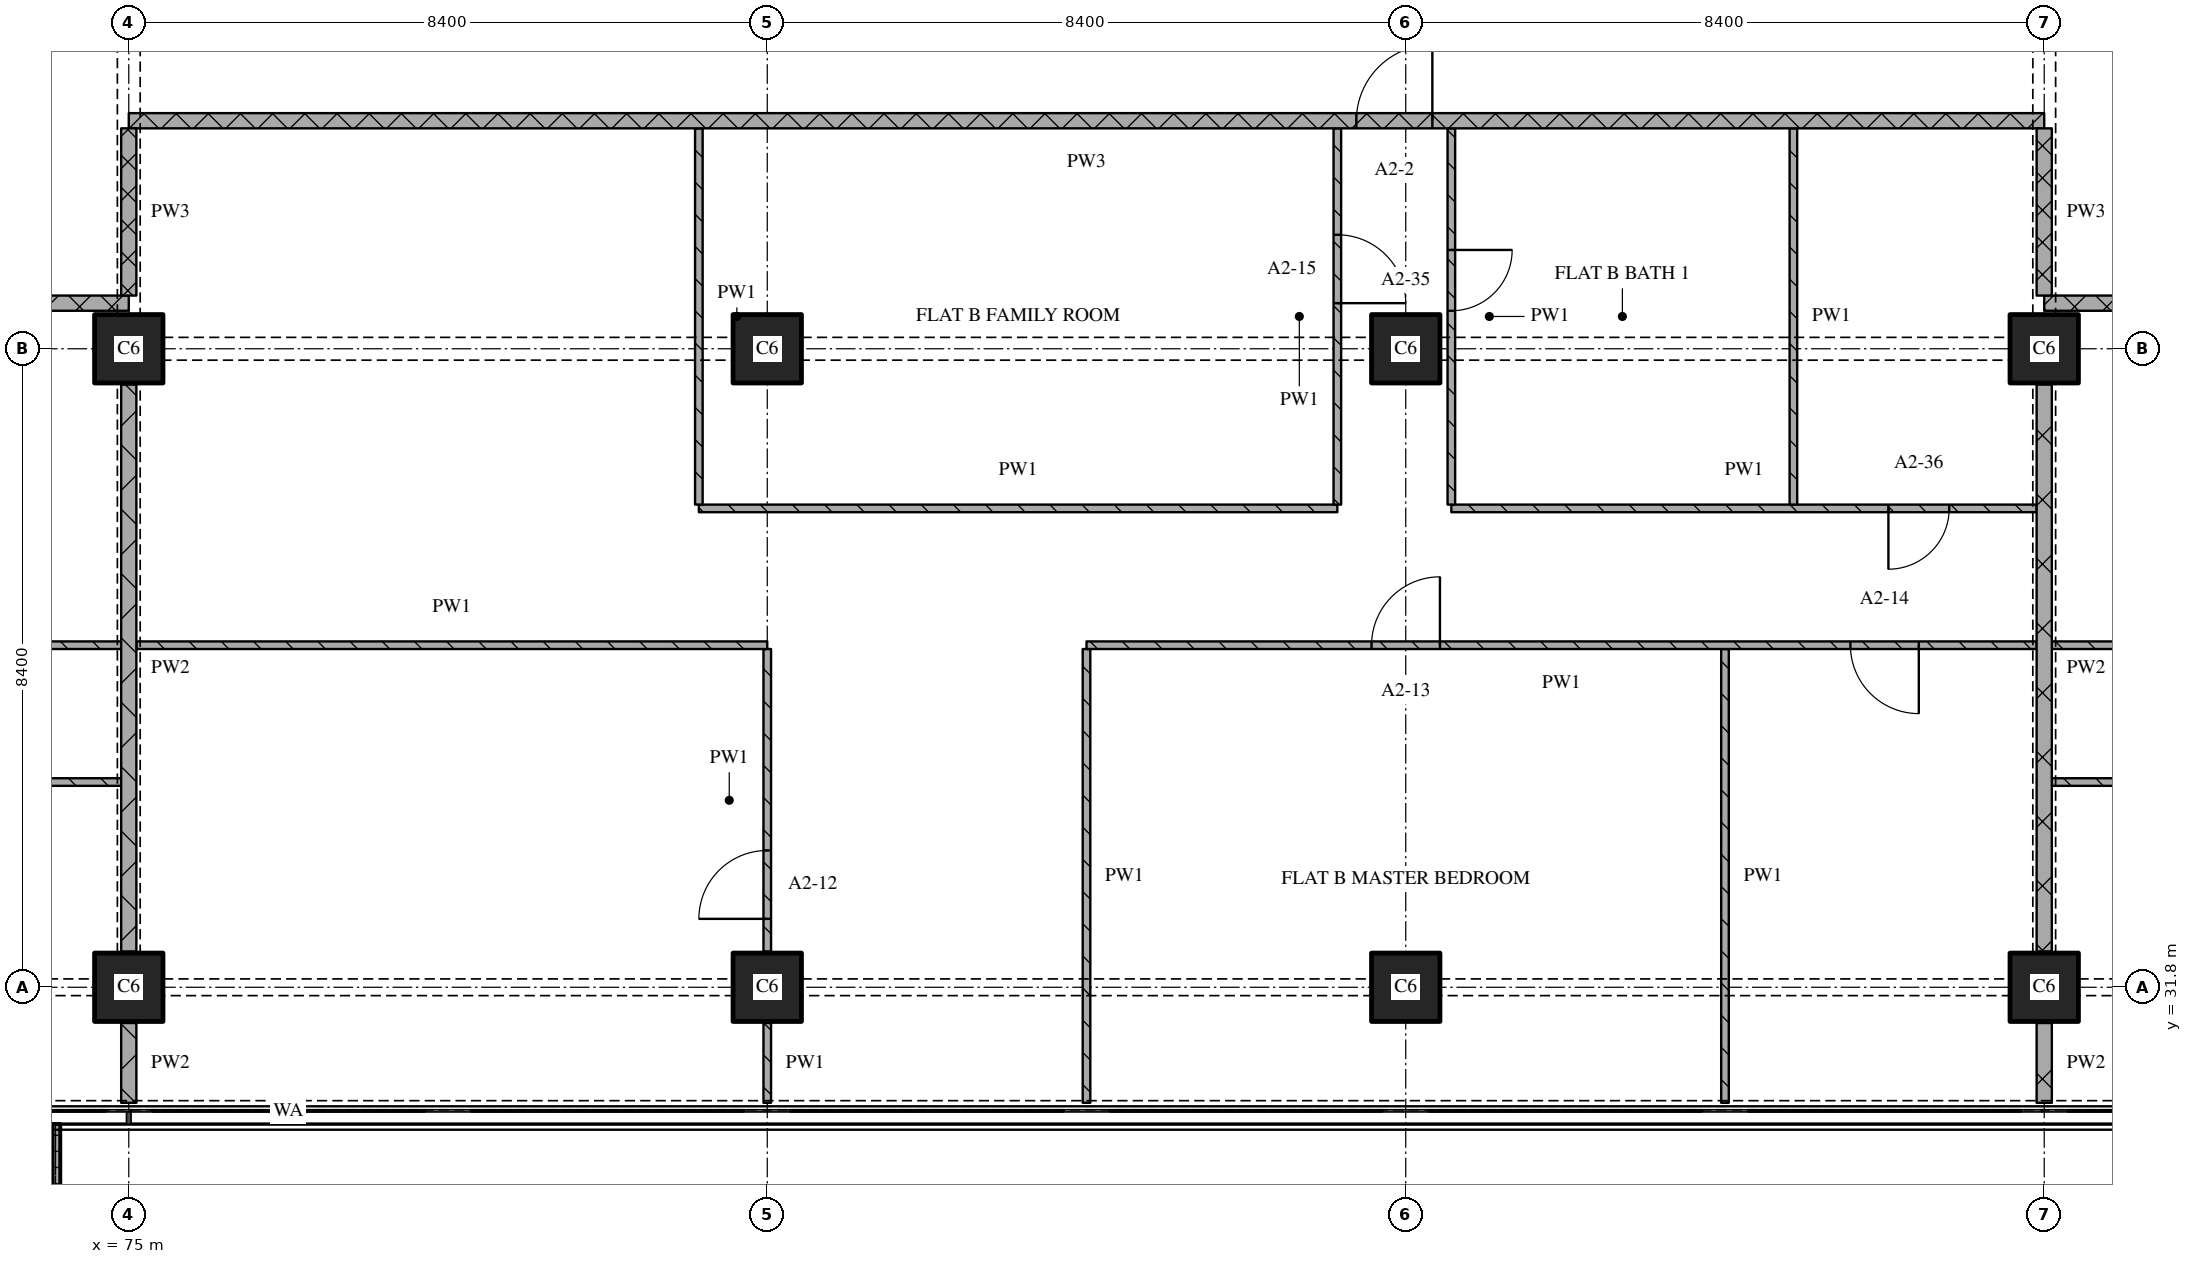
"""IFC4 building model, lengths in metres.
Left out: names, types, materials, properties, quantities, classifications, styles, units other than length and angle.
Written with IfcOpenShell. Run it as: python <this file> out.ifc"""

import sys

from ifc_helpers import new_model, si_unit, direction, frame, frame_2d, origin, origin_2d, place, context, subcontext, project, spatial, polyline, rectangle, outline, extrude, element, fill, save


model = new_model("IFC4")
c1 = context("Model", 3, precision=1e-05, world=origin(), true_north=direction((0.0, 1.0)))
c2 = subcontext(c1, "Body", "Model", "MODEL_VIEW")
j1 = project(units=[si_unit("LENGTHUNIT", "METRE"), si_unit("PLANEANGLEUNIT", "RADIAN")], contexts=[c1])
p1 = place(None, origin())
s1 = spatial("IfcSite", under=j1, at=p1, CompositionType="ELEMENT")
p2 = place(p1, origin())
s2 = spatial("IfcBuilding", under=s1, at=p2, CompositionType="ELEMENT")
p3 = place(p2, frame((0.0, 0.0, 51.6)))
s3 = spatial("IfcBuildingStorey", under=s2, at=p3, CompositionType="ELEMENT", Elevation=51.6)
for number, where, z_axis, x_axis in (
    (1, (75.0, 31.8, 0.0), (0.0, 0.0, 1.0), (1.0, 0.0, 0.0)),
    (2, (75.0, 40.2, 0.0), (0.0, 0.0, 1.0), (1.0, 0.0, 0.0)),
    (3, (83.4, 31.8, 0.0), (0.0, 0.0, 1.0), (1.0, 0.0, 0.0)),
    (4, (83.4, 40.2, 0.0), (0.0, 0.0, 1.0), (1.0, 0.0, 0.0)),
    (5, (91.8, 31.8, 0.0), (0.0, 0.0, 1.0), (1.0, 0.0, 0.0)),
    (6, (91.8, 40.2, 0.0), (0.0, 0.0, 1.0), (1.0, 0.0, 0.0)),
    (7, (100.2, 31.8, 0.0), (0.0, 0.0, 1.0), (1.0, 0.0, 0.0)),
    (8, (100.2, 40.2, 0.0), (0.0, 0.0, 1.0), (1.0, 0.0, 0.0)),
):
    element("IfcColumn", number, at=place(p3, frame(where, z_axis=z_axis, x_axis=x_axis)), inside=s3, PredefinedType="COLUMN", context=c2, shape_type="SweptSolid", body=[
        extrude(rectangle(XDim=0.9, YDim=0.9, at=origin_2d()), origin(), (0.0, 0.0, 1.0), 3.6),
    ])
p4 = place(p3, origin())
e9 = element("IfcWall", 9, at=p4, inside=s3, PredefinedType="SOLIDWALL", context=c2, shape_type="SweptSolid", body=[
    extrude(outline(polyline([(71.7, 30.0), (71.8, 30.0), (71.8, 28.5), (74.0, 28.5), (74.0, 30.0), (74.1, 30.0), (74.1, 28.4), (71.7, 28.4), (71.7, 30.0)])), origin(), (0.0, 0.0, 1.0), 1.0),
])
p5 = place(p3, frame((74.9, 34.5, 0.0), z_axis=(0.0, 0.0, 1.0), x_axis=(-1.0, 0.0, 0.0)))
e10 = element("IfcWall", 10, at=p5, inside=s3, PredefinedType="PARTITIONING", context=c2, shape_type="SweptSolid", body=[
    extrude(rectangle(XDim=16.7, YDim=0.1, at=frame_2d((8.35, 0.0))), origin(), (0.0, 0.0, 1.0), 3.32),
])
p6 = place(p5, frame((3.65, 0.0, 0.0)))
e11 = element("IfcOpeningElement", 11, at=p6, cuts=e10, PredefinedType="OPENING", context=c2, shape_type="SweptSolid", body=[
    extrude(rectangle(XDim=0.9, YDim=2.1, at=frame_2d((0.45, 1.05))), frame((0.0, 0.06, 0.0), z_axis=(0.0, -1.0, 0.0), x_axis=(1.0, 0.0, 0.0)), (0.0, 0.0, 1.0), 0.12),
])
p7 = place(p5, frame((12.05, 0.0, 0.0)))
e12 = element("IfcOpeningElement", 12, at=p7, cuts=e10, PredefinedType="OPENING", context=c2, shape_type="SweptSolid", body=[
    extrude(rectangle(XDim=0.9, YDim=2.1, at=frame_2d((0.45, 1.05))), frame((0.0, 0.06, 0.0), z_axis=(0.0, -1.0, 0.0), x_axis=(1.0, 0.0, 0.0)), (0.0, 0.0, 1.0), 0.12),
])
p8 = place(p3, frame((117.0, 34.5, 0.0), z_axis=(0.0, 0.0, 1.0), x_axis=(-1.0, 0.0, 0.0)))
e13 = element("IfcWall", 13, at=p8, inside=s3, PredefinedType="PARTITIONING", context=c2, shape_type="SweptSolid", body=[
    extrude(rectangle(XDim=16.7, YDim=0.1, at=frame_2d((8.35, 0.0))), origin(), (0.0, 0.0, 1.0), 3.32),
])
p9 = place(p8, frame((7.95, 0.0, 0.0)))
e14 = element("IfcOpeningElement", 14, at=p9, cuts=e13, PredefinedType="OPENING", context=c2, shape_type="SweptSolid", body=[
    extrude(rectangle(XDim=0.9, YDim=2.1, at=frame_2d((0.45, 1.05))), frame((0.0, 0.06, 0.0), z_axis=(0.0, -1.0, 0.0), x_axis=(1.0, 0.0, 0.0)), (0.0, 0.0, 1.0), 0.12),
])
p10 = place(p8, frame((14.25, 0.0, 0.0)))
e15 = element("IfcOpeningElement", 15, at=p10, cuts=e13, PredefinedType="OPENING", context=c2, shape_type="SweptSolid", body=[
    extrude(rectangle(XDim=0.9, YDim=2.1, at=frame_2d((0.45, 1.05))), frame((0.0, 0.06, 0.0), z_axis=(0.0, -1.0, 0.0), x_axis=(1.0, 0.0, 0.0)), (0.0, 0.0, 1.0), 0.12),
])
p11 = place(p3, frame((82.5, 38.1, 0.0), z_axis=(0.0, 0.0, 1.0), x_axis=(1.0, 0.0, 0.0)))
e16 = element("IfcWall", 16, at=p11, inside=s3, PredefinedType="PARTITIONING", context=c2, shape_type="SweptSolid", body=[
    extrude(rectangle(XDim=8.4, YDim=0.1, at=frame_2d((4.2, 0.0))), origin(), (0.0, 0.0, 1.0), 3.32),
])
p12 = place(p3, frame((92.4, 38.1, 0.0), z_axis=(0.0, 0.0, 1.0), x_axis=(1.0, 0.0, 0.0)))
e17 = element("IfcWall", 17, at=p12, inside=s3, PredefinedType="PARTITIONING", context=c2, shape_type="SweptSolid", body=[
    extrude(rectangle(XDim=7.7, YDim=0.1, at=frame_2d((3.85, 0.0))), origin(), (0.0, 0.0, 1.0), 3.32),
])
p13 = place(p12, frame((5.75, 0.0, 0.0)))
e18 = element("IfcOpeningElement", 18, at=p13, cuts=e17, PredefinedType="OPENING", context=c2, shape_type="SweptSolid", body=[
    extrude(rectangle(XDim=0.8, YDim=2.1, at=frame_2d((0.4, 1.05))), frame((0.0, 0.06, 0.0), z_axis=(0.0, -1.0, 0.0), x_axis=(1.0, 0.0, 0.0)), (0.0, 0.0, 1.0), 0.12),
])
p14 = place(p3, frame((75.0, 40.8, 0.0), z_axis=(0.0, 0.0, 1.0), x_axis=(-1.0, 0.0, 0.0)))
e19 = element("IfcWall", 19, at=p14, inside=s3, PredefinedType="PARTITIONING", context=c2, shape_type="SweptSolid", body=[
    extrude(rectangle(XDim=24.08, YDim=0.2, at=frame_2d((12.04, 0.0))), origin(), (0.0, 0.0, 1.0), 3.32),
])
p15 = place(p14, frame((8.95, 0.0, 0.0)))
e20 = element("IfcOpeningElement", 20, at=p15, cuts=e19, PredefinedType="OPENING", context=c2, shape_type="SweptSolid", body=[
    extrude(rectangle(XDim=1.0, YDim=2.1, at=frame_2d((0.5, 1.05))), frame((0.0, 0.11, 0.0), z_axis=(0.0, -1.0, 0.0), x_axis=(1.0, 0.0, 0.0)), (0.0, 0.0, 1.0), 0.22),
])
p16 = place(p3, frame((124.28, 40.8, 0.0), z_axis=(0.0, 0.0, 1.0), x_axis=(-1.0, 0.0, 0.0)))
e21 = element("IfcWall", 21, at=p16, inside=s3, PredefinedType="PARTITIONING", context=c2, shape_type="SweptSolid", body=[
    extrude(rectangle(XDim=24.08, YDim=0.2, at=frame_2d((12.04, 0.0))), origin(), (0.0, 0.0, 1.0), 3.32),
])
p17 = place(p16, frame((12.93, 0.0, 0.0)))
e22 = element("IfcOpeningElement", 22, at=p17, cuts=e21, PredefinedType="OPENING", context=c2, shape_type="SweptSolid", body=[
    extrude(rectangle(XDim=1.0, YDim=2.1, at=frame_2d((0.5, 1.05))), frame((0.0, 0.11, 0.0), z_axis=(0.0, -1.0, 0.0), x_axis=(1.0, 0.0, 0.0)), (0.0, 0.0, 1.0), 0.22),
])
p18 = place(p3, frame((100.2, 43.2, 0.0), z_axis=(0.0, 0.0, 1.0), x_axis=(-1.0, 0.0, 0.0)))
e23 = element("IfcWall", 23, at=p18, inside=s3, PredefinedType="PARTITIONING", context=c2, shape_type="SweptSolid", body=[
    extrude(rectangle(XDim=25.2, YDim=0.2, at=frame_2d((12.6, 0.0))), origin(), (0.0, 0.0, 1.0), 3.32),
])
p19 = place(p18, frame((8.05, 0.0, 0.0)))
e24 = element("IfcOpeningElement", 24, at=p19, cuts=e23, PredefinedType="OPENING", context=c2, shape_type="SweptSolid", body=[
    extrude(rectangle(XDim=1.0, YDim=2.1, at=frame_2d((0.5, 1.05))), frame((0.0, 0.11, 0.0), z_axis=(0.0, -1.0, 0.0), x_axis=(1.0, 0.0, 0.0)), (0.0, 0.0, 1.0), 0.22),
])
p20 = place(p3, frame((75.0, 43.1, 0.0), z_axis=(0.0, 0.0, 1.0), x_axis=(0.0, -1.0, 0.0)))
e25 = element("IfcWall", 25, at=p20, inside=s3, PredefinedType="PARTITIONING", context=c2, shape_type="SweptSolid", body=[
    extrude(rectangle(XDim=2.2, YDim=0.2, at=frame_2d((1.1, 0.0))), origin(), (0.0, 0.0, 1.0), 2.43),
])
p21 = place(p3, frame((75.0, 31.33, 0.0), z_axis=(0.0, 0.0, 1.0), x_axis=(0.0, -1.0, 0.0)))
e26 = element("IfcWall", 26, at=p21, inside=s3, PredefinedType="PARTITIONING", context=c2, shape_type="SweptSolid", body=[
    extrude(rectangle(XDim=1.05, YDim=0.2, at=frame_2d((0.525, 0.0))), origin(), (0.0, 0.0, 1.0), 3.32),
])
p22 = place(p3, frame((75.0, 39.73, 0.0), z_axis=(0.0, 0.0, 1.0), x_axis=(0.0, -1.0, 0.0)))
e27 = element("IfcWall", 27, at=p22, inside=s3, PredefinedType="PARTITIONING", context=c2, shape_type="SweptSolid", body=[
    extrude(rectangle(XDim=7.46, YDim=0.2, at=frame_2d((3.73, 0.0))), origin(), (0.0, 0.0, 1.0), 2.83),
])
p23 = place(p3, frame((82.5, 43.1, 0.0), z_axis=(0.0, 0.0, 1.0), x_axis=(0.0, -1.0, 0.0)))
e28 = element("IfcWall", 28, at=p23, inside=s3, PredefinedType="PARTITIONING", context=c2, shape_type="SweptSolid", body=[
    extrude(rectangle(XDim=4.95, YDim=0.1, at=frame_2d((2.475, 0.0))), origin(), (0.0, 0.0, 1.0), 3.32),
])
p24 = place(p3, frame((83.4, 31.33, 0.0), z_axis=(0.0, 0.0, 1.0), x_axis=(0.0, -1.0, 0.0)))
e29 = element("IfcWall", 29, at=p24, inside=s3, PredefinedType="PARTITIONING", context=c2, shape_type="SweptSolid", body=[
    extrude(rectangle(XDim=1.05, YDim=0.1, at=frame_2d((0.525, 0.0))), origin(), (0.0, 0.0, 1.0), 3.32),
])
p25 = place(p3, frame((83.4, 32.27, 0.0), z_axis=(0.0, 0.0, 1.0), x_axis=(0.0, 1.0, 0.0)))
e30 = element("IfcWall", 30, at=p25, inside=s3, PredefinedType="PARTITIONING", context=c2, shape_type="SweptSolid", body=[
    extrude(rectangle(XDim=3.98, YDim=0.1, at=frame_2d((1.99, 0.0))), origin(), (0.0, 0.0, 1.0), 3.32),
])
p26 = place(p25, frame((0.43, 0.0, 0.0)))
e31 = element("IfcOpeningElement", 31, at=p26, cuts=e30, PredefinedType="OPENING", context=c2, shape_type="SweptSolid", body=[
    extrude(rectangle(XDim=0.9, YDim=2.1, at=frame_2d((0.45, 1.05))), frame((0.0, 0.06, 0.0), z_axis=(0.0, -1.0, 0.0), x_axis=(1.0, 0.0, 0.0)), (0.0, 0.0, 1.0), 0.12),
])
p27 = place(p3, frame((87.6, 36.25, 0.0), z_axis=(0.0, 0.0, 1.0), x_axis=(0.0, -1.0, 0.0)))
e32 = element("IfcWall", 32, at=p27, inside=s3, PredefinedType="PARTITIONING", context=c2, shape_type="SweptSolid", body=[
    extrude(rectangle(XDim=5.97, YDim=0.1, at=frame_2d((2.985, 0.0))), origin(), (0.0, 0.0, 1.0), 3.32),
])
p28 = place(p3, frame((90.9, 38.15, 0.0), z_axis=(0.0, 0.0, 1.0), x_axis=(0.0, 1.0, 0.0)))
e33 = element("IfcWall", 33, at=p28, inside=s3, PredefinedType="PARTITIONING", context=c2, shape_type="SweptSolid", body=[
    extrude(rectangle(XDim=4.95, YDim=0.1, at=frame_2d((2.475, 0.0))), origin(), (0.0, 0.0, 1.0), 3.32),
])
p29 = place(p28, frame((2.65, 0.0, 0.0)))
e34 = element("IfcOpeningElement", 34, at=p29, cuts=e33, PredefinedType="OPENING", context=c2, shape_type="SweptSolid", body=[
    extrude(rectangle(XDim=0.9, YDim=2.1, at=frame_2d((0.45, 1.05))), frame((0.0, 0.06, 0.0), z_axis=(0.0, -1.0, 0.0), x_axis=(1.0, 0.0, 0.0)), (0.0, 0.0, 1.0), 0.12),
])
p30 = place(p3, frame((92.4, 43.1, 0.0), z_axis=(0.0, 0.0, 1.0), x_axis=(0.0, -1.0, 0.0)))
e35 = element("IfcWall", 35, at=p30, inside=s3, PredefinedType="PARTITIONING", context=c2, shape_type="SweptSolid", body=[
    extrude(rectangle(XDim=4.95, YDim=0.1, at=frame_2d((2.475, 0.0))), origin(), (0.0, 0.0, 1.0), 3.32),
])
p31 = place(p30, frame((1.6, 0.0, 0.0)))
e36 = element("IfcOpeningElement", 36, at=p31, cuts=e35, PredefinedType="OPENING", context=c2, shape_type="SweptSolid", body=[
    extrude(rectangle(XDim=0.8, YDim=2.1, at=frame_2d((0.4, 1.05))), frame((0.0, 0.06, 0.0), z_axis=(0.0, -1.0, 0.0), x_axis=(1.0, 0.0, 0.0)), (0.0, 0.0, 1.0), 0.12),
])
p32 = place(p3, frame((96.0, 36.25, 0.0), z_axis=(0.0, 0.0, 1.0), x_axis=(0.0, -1.0, 0.0)))
e37 = element("IfcWall", 37, at=p32, inside=s3, PredefinedType="PARTITIONING", context=c2, shape_type="SweptSolid", body=[
    extrude(rectangle(XDim=5.97, YDim=0.1, at=frame_2d((2.985, 0.0))), origin(), (0.0, 0.0, 1.0), 3.32),
])
p33 = place(p3, frame((96.9, 43.1, 0.0), z_axis=(0.0, 0.0, 1.0), x_axis=(0.0, -1.0, 0.0)))
e38 = element("IfcWall", 38, at=p33, inside=s3, PredefinedType="PARTITIONING", context=c2, shape_type="SweptSolid", body=[
    extrude(rectangle(XDim=4.95, YDim=0.1, at=frame_2d((2.475, 0.0))), origin(), (0.0, 0.0, 1.0), 3.32),
])
p34 = place(p3, frame((100.2, 43.1, 0.0), z_axis=(0.0, 0.0, 1.0), x_axis=(0.0, -1.0, 0.0)))
e39 = element("IfcWall", 39, at=p34, inside=s3, PredefinedType="PARTITIONING", context=c2, shape_type="SweptSolid", body=[
    extrude(rectangle(XDim=2.2, YDim=0.2, at=frame_2d((1.1, 0.0))), origin(), (0.0, 0.0, 1.0), 2.43),
])
p35 = place(p3, frame((100.2, 31.33, 0.0), z_axis=(0.0, 0.0, 1.0), x_axis=(0.0, -1.0, 0.0)))
e40 = element("IfcWall", 40, at=p35, inside=s3, PredefinedType="PARTITIONING", context=c2, shape_type="SweptSolid", body=[
    extrude(rectangle(XDim=1.05, YDim=0.2, at=frame_2d((0.525, 0.0))), origin(), (0.0, 0.0, 1.0), 3.32),
])
p36 = place(p3, frame((100.2, 39.73, 0.0), z_axis=(0.0, 0.0, 1.0), x_axis=(0.0, -1.0, 0.0)))
e41 = element("IfcWall", 41, at=p36, inside=s3, PredefinedType="PARTITIONING", context=c2, shape_type="SweptSolid", body=[
    extrude(rectangle(XDim=7.46, YDim=0.2, at=frame_2d((3.73, 0.0))), origin(), (0.0, 0.0, 1.0), 2.83),
])
p37 = place(p3, frame((66.3, 36.3, 0.0), z_axis=(0.0, 0.0, 1.0), x_axis=(1.0, 0.0, 0.0)))
e42 = element("IfcWall", 42, at=p37, inside=s3, PredefinedType="PARTITIONING", context=c2, shape_type="SweptSolid", body=[
    extrude(rectangle(XDim=8.6, YDim=0.1, at=frame_2d((4.3, 0.0))), origin(), (0.0, 0.0, 1.0), 3.32),
])
p38 = place(p37, frame((6.2, 0.0, 0.0)))
e43 = element("IfcOpeningElement", 43, at=p38, cuts=e42, PredefinedType="OPENING", context=c2, shape_type="SweptSolid", body=[
    extrude(rectangle(XDim=0.8, YDim=2.1, at=frame_2d((0.4, 1.05))), frame((0.0, 0.06, 0.0), z_axis=(0.0, -1.0, 0.0), x_axis=(1.0, 0.0, 0.0)), (0.0, 0.0, 1.0), 0.12),
])
p39 = place(p3, frame((75.1, 36.3, 0.0), z_axis=(0.0, 0.0, 1.0), x_axis=(1.0, 0.0, 0.0)))
e44 = element("IfcWall", 44, at=p39, inside=s3, PredefinedType="PARTITIONING", context=c2, shape_type="SweptSolid", body=[
    extrude(rectangle(XDim=8.3, YDim=0.1, at=frame_2d((4.15, 0.0))), origin(), (0.0, 0.0, 1.0), 3.32),
])
p40 = place(p3, frame((100.1, 36.3, 0.0), z_axis=(0.0, 0.0, 1.0), x_axis=(-1.0, 0.0, 0.0)))
e45 = element("IfcWall", 45, at=p40, inside=s3, PredefinedType="PARTITIONING", context=c2, shape_type="SweptSolid", body=[
    extrude(rectangle(XDim=12.5, YDim=0.1, at=frame_2d((6.25, 0.0))), origin(), (0.0, 0.0, 1.0), 3.32),
])
p41 = place(p40, frame((1.55, 0.0, 0.0)))
e46 = element("IfcOpeningElement", 46, at=p41, cuts=e45, PredefinedType="OPENING", context=c2, shape_type="SweptSolid", body=[
    extrude(rectangle(XDim=0.9, YDim=2.1, at=frame_2d((0.45, 1.05))), frame((0.0, 0.06, 0.0), z_axis=(0.0, -1.0, 0.0), x_axis=(1.0, 0.0, 0.0)), (0.0, 0.0, 1.0), 0.12),
])
p42 = place(p40, frame((7.85, 0.0, 0.0)))
e47 = element("IfcOpeningElement", 47, at=p42, cuts=e45, PredefinedType="OPENING", context=c2, shape_type="SweptSolid", body=[
    extrude(rectangle(XDim=0.9, YDim=2.1, at=frame_2d((0.45, 1.05))), frame((0.0, 0.06, 0.0), z_axis=(0.0, -1.0, 0.0), x_axis=(1.0, 0.0, 0.0)), (0.0, 0.0, 1.0), 0.12),
])
p43 = place(p3, frame((100.3, 36.3, 0.0), z_axis=(0.0, 0.0, 1.0), x_axis=(1.0, 0.0, 0.0)))
e48 = element("IfcWall", 48, at=p43, inside=s3, PredefinedType="PARTITIONING", context=c2, shape_type="SweptSolid", body=[
    extrude(rectangle(XDim=9.8, YDim=0.1, at=frame_2d((4.9, 0.0))), origin(), (0.0, 0.0, 1.0), 3.32),
])
p44 = place(p43, frame((1.75, 0.0, 0.0)))
e49 = element("IfcOpeningElement", 49, at=p44, cuts=e48, PredefinedType="OPENING", context=c2, shape_type="SweptSolid", body=[
    extrude(rectangle(XDim=0.8, YDim=2.1, at=frame_2d((0.4, 1.05))), frame((0.0, 0.06, 0.0), z_axis=(0.0, -1.0, 0.0), x_axis=(1.0, 0.0, 0.0)), (0.0, 0.0, 1.0), 0.12),
])
p45 = place(p13, origin())
e50 = element("IfcDoor", 50, at=p45, inside=s3, OperationType="SINGLE_SWING_RIGHT", PredefinedType="DOOR", context=c2, shape_type="SweptSolid", body=[
    extrude(rectangle(XDim=0.8, YDim=2.1, at=frame_2d((0.4, 1.05))), frame((0.0, 0.025, 0.0), z_axis=(0.0, -1.0, 0.0), x_axis=(1.0, 0.0, 0.0)), (0.0, 0.0, 1.0), 0.05),
])
fill(e18, e50)
p46 = place(p19, origin())
e51 = element("IfcDoor", 51, at=p46, inside=s3, OperationType="SINGLE_SWING_RIGHT", PredefinedType="DOOR", context=c2, shape_type="SweptSolid", body=[
    extrude(rectangle(XDim=1.0, YDim=2.1, at=frame_2d((0.5, 1.05))), frame((0.0, 0.025, 0.0), z_axis=(0.0, -1.0, 0.0), x_axis=(1.0, 0.0, 0.0)), (0.0, 0.0, 1.0), 0.05),
])
fill(e24, e51)
p47 = place(p26, origin())
e52 = element("IfcDoor", 52, at=p47, inside=s3, OperationType="SINGLE_SWING_LEFT", PredefinedType="DOOR", context=c2, shape_type="SweptSolid", body=[
    extrude(rectangle(XDim=0.9, YDim=2.1, at=frame_2d((0.45, 1.05))), frame((0.0, 0.025, 0.0), z_axis=(0.0, -1.0, 0.0), x_axis=(1.0, 0.0, 0.0)), (0.0, 0.0, 1.0), 0.05),
])
fill(e31, e52)
p48 = place(p29, origin())
e53 = element("IfcDoor", 53, at=p48, inside=s3, OperationType="SINGLE_SWING_RIGHT", PredefinedType="DOOR", context=c2, shape_type="SweptSolid", body=[
    extrude(rectangle(XDim=0.9, YDim=2.1, at=frame_2d((0.45, 1.05))), frame((0.0, 0.025, 0.0), z_axis=(0.0, -1.0, 0.0), x_axis=(1.0, 0.0, 0.0)), (0.0, 0.0, 1.0), 0.05),
])
fill(e34, e53)
p49 = place(p31, origin())
e54 = element("IfcDoor", 54, at=p49, inside=s3, OperationType="SINGLE_SWING_LEFT", PredefinedType="DOOR", context=c2, shape_type="SweptSolid", body=[
    extrude(rectangle(XDim=0.8, YDim=2.1, at=frame_2d((0.4, 1.05))), frame((0.0, 0.025, 0.0), z_axis=(0.0, -1.0, 0.0), x_axis=(1.0, 0.0, 0.0)), (0.0, 0.0, 1.0), 0.05),
])
fill(e36, e54)
p50 = place(p41, origin())
e55 = element("IfcDoor", 55, at=p50, inside=s3, OperationType="SINGLE_SWING_LEFT", PredefinedType="DOOR", context=c2, shape_type="SweptSolid", body=[
    extrude(rectangle(XDim=0.9, YDim=2.1, at=frame_2d((0.45, 1.05))), frame((0.0, 0.025, 0.0), z_axis=(0.0, -1.0, 0.0), x_axis=(1.0, 0.0, 0.0)), (0.0, 0.0, 1.0), 0.05),
])
fill(e46, e55)
p51 = place(p42, origin())
e56 = element("IfcDoor", 56, at=p51, inside=s3, OperationType="SINGLE_SWING_RIGHT", PredefinedType="DOOR", context=c2, shape_type="SweptSolid", body=[
    extrude(rectangle(XDim=0.9, YDim=2.1, at=frame_2d((0.45, 1.05))), frame((0.0, 0.025, 0.0), z_axis=(0.0, -1.0, 0.0), x_axis=(1.0, 0.0, 0.0)), (0.0, 0.0, 1.0), 0.05),
])
fill(e47, e56)
save(model, sys.argv[1])
